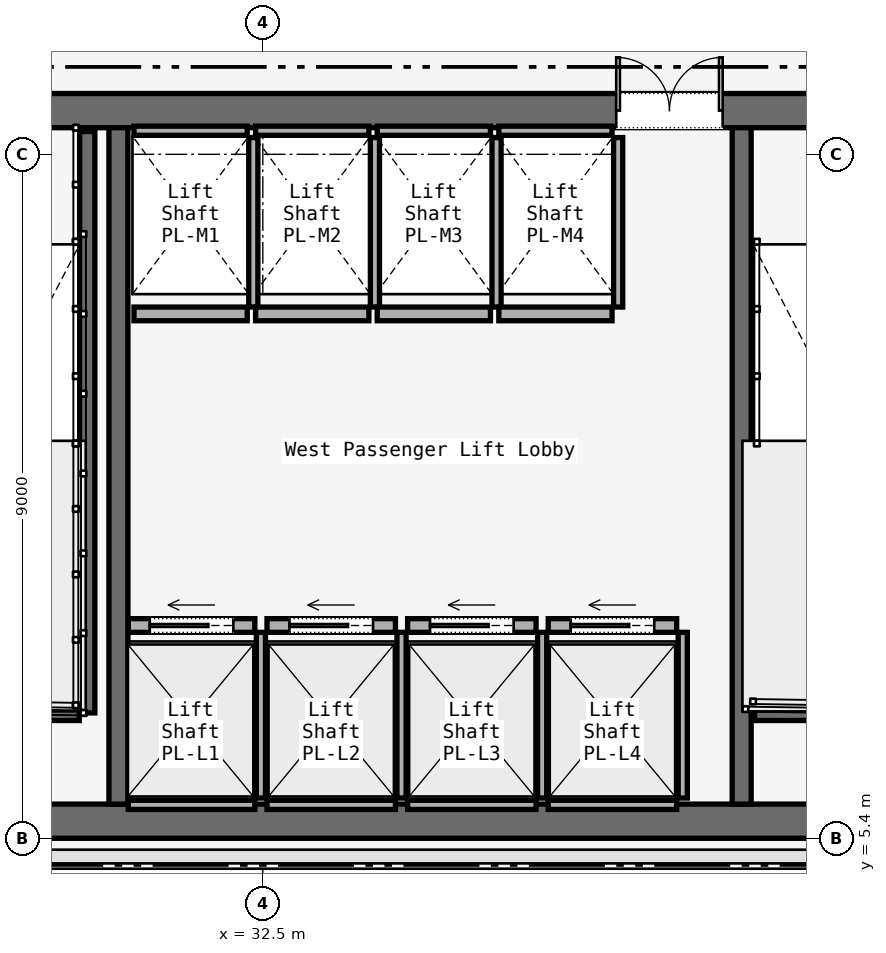
"""IFC4 building model, lengths in metres.
Left out: names, types, materials, properties, quantities, classifications, styles, units other than length and angle.
Written with IfcOpenShell. Run it as: python <this file> out.ifc"""

import sys

from ifc_helpers import new_model, si_unit, direction, frame, frame_2d, origin, place, context, subcontext, project, spatial, rectangle, extrude, element, fill, save


model = new_model("IFC4")
c1 = context("Model", 3, precision=1e-05, world=origin(), true_north=direction((0.0, 1.0)))
c2 = subcontext(c1, "Body", "Model", "MODEL_VIEW")
j1 = project(units=[si_unit("LENGTHUNIT", "METRE"), si_unit("PLANEANGLEUNIT", "RADIAN")], contexts=[c1])
p1 = place(None, origin())
s1 = spatial("IfcSite", under=j1, at=p1, CompositionType="ELEMENT")
p2 = place(p1, origin())
s2 = spatial("IfcBuilding", under=s1, at=p2, CompositionType="ELEMENT")
p3 = place(p2, frame((0.0, 0.0, 47.4)))
s3 = spatial("IfcBuildingStorey", under=s2, at=p3, CompositionType="ELEMENT", Elevation=47.4)
p4 = place(p3, frame((26.45, 14.975, 0.0), z_axis=(0.0, 0.0, 1.0), x_axis=(1.0, 0.0, 0.0)))
e1 = element("IfcWall", 1, at=p4, inside=s3, PredefinedType="SOLIDWALL", context=c2, shape_type="SweptSolid", body=[
    extrude(rectangle(XDim=31.1, YDim=0.45, at=frame_2d((15.55, 0.0))), origin(), (0.0, 0.0, 1.0), 3.58),
])
p5 = place(p4, frame((1.65, 0.0, 0.0)))
e2 = element("IfcOpeningElement", 2, at=p5, cuts=e1, PredefinedType="OPENING", context=c2, shape_type="SweptSolid", body=[
    extrude(rectangle(XDim=1.1, YDim=2.2, at=frame_2d((0.55, 1.1))), frame((0.0, 0.225, 0.0), z_axis=(0.0, -1.0, 0.0), x_axis=(1.0, 0.0, 0.0)), (0.0, 0.0, 1.0), 0.45),
])
p6 = place(p4, frame((13.65, 0.0, 0.0)))
e3 = element("IfcOpeningElement", 3, at=p6, cuts=e1, PredefinedType="OPENING", context=c2, shape_type="SweptSolid", body=[
    extrude(rectangle(XDim=1.1, YDim=2.2, at=frame_2d((0.55, 1.1))), frame((0.0, 0.225, 0.0), z_axis=(0.0, -1.0, 0.0), x_axis=(1.0, 0.0, 0.0)), (0.0, 0.0, 1.0), 0.45),
])
p7 = place(p4, frame((25.55, 0.0, 0.0)))
e4 = element("IfcOpeningElement", 4, at=p7, cuts=e1, PredefinedType="OPENING", context=c2, shape_type="SweptSolid", body=[
    extrude(rectangle(XDim=1.1, YDim=2.2, at=frame_2d((0.55, 1.1))), frame((0.0, 0.225, 0.0), z_axis=(0.0, -1.0, 0.0), x_axis=(1.0, 0.0, 0.0)), (0.0, 0.0, 1.0), 0.45),
])
p8 = place(p4, frame((10.7, 0.0, 0.0)))
e5 = element("IfcOpeningElement", 5, at=p8, cuts=e1, PredefinedType="OPENING", context=c2, shape_type="SweptSolid", body=[
    extrude(rectangle(XDim=1.4, YDim=2.2, at=frame_2d((0.7, 1.1))), frame((0.0, 0.225, 0.0), z_axis=(0.0, -1.0, 0.0), x_axis=(1.0, 0.0, 0.0)), (0.0, 0.0, 1.0), 0.45),
])
p9 = place(p4, frame((19.35, 0.0, 0.0)))
e6 = element("IfcOpeningElement", 6, at=p9, cuts=e1, PredefinedType="OPENING", context=c2, shape_type="SweptSolid", body=[
    extrude(rectangle(XDim=1.1, YDim=2.2, at=frame_2d((0.55, 1.1))), frame((0.0, 0.225, 0.0), z_axis=(0.0, -1.0, 0.0), x_axis=(1.0, 0.0, 0.0)), (0.0, 0.0, 1.0), 0.45),
])
p10 = place(p4, frame((21.4, 0.0, 0.0)))
e7 = element("IfcOpeningElement", 7, at=p10, cuts=e1, PredefinedType="OPENING", context=c2, shape_type="SweptSolid", body=[
    extrude(rectangle(XDim=0.9, YDim=2.1, at=frame_2d((0.45, 1.05))), frame((0.0, 0.225, 0.0), z_axis=(0.0, -1.0, 0.0), x_axis=(1.0, 0.0, 0.0)), (0.0, 0.0, 1.0), 0.45),
])
p11 = place(p4, frame((23.35, 0.0, 0.0)))
e8 = element("IfcOpeningElement", 8, at=p11, cuts=e1, PredefinedType="OPENING", context=c2, shape_type="SweptSolid", body=[
    extrude(rectangle(XDim=1.3, YDim=2.3, at=frame_2d((0.65, 1.15))), frame((0.0, 0.225, 0.0), z_axis=(0.0, -1.0, 0.0), x_axis=(1.0, 0.0, 0.0)), (0.0, 0.0, 1.0), 0.45),
])
p12 = place(p3, frame((26.45, 5.625, 0.0), z_axis=(0.0, 0.0, 1.0), x_axis=(1.0, 0.0, 0.0)))
e9 = element("IfcWall", 9, at=p12, inside=s3, PredefinedType="SOLIDWALL", context=c2, shape_type="SweptSolid", body=[
    extrude(rectangle(XDim=31.1, YDim=0.45, at=frame_2d((15.55, 0.0))), origin(), (0.0, 0.0, 1.0), 3.58),
])
for number, where, z_axis, x_axis in (
    (10, (30.6, 5.85, 0.0), (0.0, 0.0, 1.0), (0.0, 1.0, 0.0)),
    (11, (38.8, 5.85, 0.0), (0.0, 0.0, 1.0), (0.0, 1.0, 0.0)),
):
    element("IfcWall", number, at=place(p3, frame(where, z_axis=z_axis, x_axis=x_axis)), inside=s3, PredefinedType="SOLIDWALL", context=c2, shape_type="SweptSolid", body=[
        extrude(rectangle(XDim=8.9, YDim=0.25, at=frame_2d((4.45, 0.0))), origin(), (0.0, 0.0, 1.0), 3.58),
    ])
p13 = place(p3, frame((30.19, 14.7, 0.0), z_axis=(0.0, 0.0, 1.0), x_axis=(0.0, -1.0, 0.0)))
e12 = element("IfcWall", 12, at=p13, inside=s3, PredefinedType="SOLIDWALL", context=c2, shape_type="SweptSolid", body=[
    extrude(rectangle(XDim=7.65, YDim=0.2, at=frame_2d((3.825, 0.0))), origin(), (0.0, 0.0, 1.0), 3.8),
])
for number, where, z_axis, x_axis in (
    (13, (26.97, 7.05, 0.0), (0.0, 0.0, 1.0), (1.0, 0.0, 0.0)),
    (14, (38.97, 7.05, 0.0), (0.0, 0.0, 1.0), (1.0, 0.0, 0.0)),
):
    element("IfcWall", number, at=place(p3, frame(where, z_axis=z_axis, x_axis=x_axis)), inside=s3, PredefinedType="SOLIDWALL", context=c2, shape_type="SweptSolid", body=[
        extrude(rectangle(XDim=3.115, YDim=0.2, at=frame_2d((1.558, 0.0))), origin(), (0.0, 0.0, 1.0), 3.8),
    ])
p14 = place(p3, frame((30.73, 8.2, 0.0), z_axis=(0.0, 0.0, 1.0), x_axis=(1.0, 0.0, 0.0)))
e15 = element("IfcWall", 15, at=p14, inside=s3, PredefinedType="SOLIDWALL", context=c2, shape_type="SweptSolid", body=[
    extrude(rectangle(XDim=1.665, YDim=0.18, at=frame_2d((0.833, 0.0))), origin(), (0.0, 0.0, 1.0), 2.933),
])
p15 = place(p14, frame((0.282, 0.0, 0.0)))
e16 = element("IfcOpeningElement", 16, at=p15, cuts=e15, PredefinedType="OPENING", context=c2, shape_type="SweptSolid", body=[
    extrude(rectangle(XDim=1.1, YDim=2.2, at=frame_2d((0.55, 1.1))), frame((0.0, 0.09, 0.0), z_axis=(0.0, -1.0, 0.0), x_axis=(1.0, 0.0, 0.0)), (0.0, 0.0, 1.0), 0.18),
])
p16 = place(p3, frame((30.73, 5.84, 0.0), z_axis=(0.0, 0.0, 1.0), x_axis=(1.0, 0.0, 0.0)))
e17 = element("IfcWall", 17, at=p16, inside=s3, PredefinedType="SOLIDWALL", context=c2, shape_type="SweptSolid", body=[
    extrude(rectangle(XDim=1.665, YDim=0.12, at=frame_2d((0.833, 0.0))), origin(), (0.0, 0.0, 1.0), 2.933),
])
p17 = place(p3, frame((32.475, 5.93, 0.0), z_axis=(0.0, 0.0, 1.0), x_axis=(0.0, 1.0, 0.0)))
e18 = element("IfcWall", 18, at=p17, inside=s3, PredefinedType="SOLIDWALL", context=c2, shape_type="SweptSolid", body=[
    extrude(rectangle(XDim=2.18, YDim=0.12, at=frame_2d((1.09, 0.0))), origin(), (0.0, 0.0, 1.0), 2.933),
])
p18 = place(p3, frame((32.555, 8.2, 0.0), z_axis=(0.0, 0.0, 1.0), x_axis=(1.0, 0.0, 0.0)))
e19 = element("IfcWall", 19, at=p18, inside=s3, PredefinedType="SOLIDWALL", context=c2, shape_type="SweptSolid", body=[
    extrude(rectangle(XDim=1.69, YDim=0.18, at=frame_2d((0.845, 0.0))), origin(), (0.0, 0.0, 1.0), 2.933),
])
p19 = place(p18, frame((0.295, 0.0, 0.0)))
e20 = element("IfcOpeningElement", 20, at=p19, cuts=e19, PredefinedType="OPENING", context=c2, shape_type="SweptSolid", body=[
    extrude(rectangle(XDim=1.1, YDim=2.2, at=frame_2d((0.55, 1.1))), frame((0.0, 0.09, 0.0), z_axis=(0.0, -1.0, 0.0), x_axis=(1.0, 0.0, 0.0)), (0.0, 0.0, 1.0), 0.18),
])
p20 = place(p3, frame((32.555, 5.84, 0.0), z_axis=(0.0, 0.0, 1.0), x_axis=(1.0, 0.0, 0.0)))
e21 = element("IfcWall", 21, at=p20, inside=s3, PredefinedType="SOLIDWALL", context=c2, shape_type="SweptSolid", body=[
    extrude(rectangle(XDim=1.69, YDim=0.12, at=frame_2d((0.845, 0.0))), origin(), (0.0, 0.0, 1.0), 2.933),
])
p21 = place(p3, frame((34.325, 5.93, 0.0), z_axis=(0.0, 0.0, 1.0), x_axis=(0.0, 1.0, 0.0)))
e22 = element("IfcWall", 22, at=p21, inside=s3, PredefinedType="SOLIDWALL", context=c2, shape_type="SweptSolid", body=[
    extrude(rectangle(XDim=2.18, YDim=0.12, at=frame_2d((1.09, 0.0))), origin(), (0.0, 0.0, 1.0), 2.933),
])
p22 = place(p3, frame((34.405, 8.2, 0.0), z_axis=(0.0, 0.0, 1.0), x_axis=(1.0, 0.0, 0.0)))
e23 = element("IfcWall", 23, at=p22, inside=s3, PredefinedType="SOLIDWALL", context=c2, shape_type="SweptSolid", body=[
    extrude(rectangle(XDim=1.69, YDim=0.18, at=frame_2d((0.845, 0.0))), origin(), (0.0, 0.0, 1.0), 2.933),
])
p23 = place(p22, frame((0.295, 0.0, 0.0)))
e24 = element("IfcOpeningElement", 24, at=p23, cuts=e23, PredefinedType="OPENING", context=c2, shape_type="SweptSolid", body=[
    extrude(rectangle(XDim=1.1, YDim=2.2, at=frame_2d((0.55, 1.1))), frame((0.0, 0.09, 0.0), z_axis=(0.0, -1.0, 0.0), x_axis=(1.0, 0.0, 0.0)), (0.0, 0.0, 1.0), 0.18),
])
p24 = place(p3, frame((34.405, 5.84, 0.0), z_axis=(0.0, 0.0, 1.0), x_axis=(1.0, 0.0, 0.0)))
e25 = element("IfcWall", 25, at=p24, inside=s3, PredefinedType="SOLIDWALL", context=c2, shape_type="SweptSolid", body=[
    extrude(rectangle(XDim=1.69, YDim=0.12, at=frame_2d((0.845, 0.0))), origin(), (0.0, 0.0, 1.0), 2.933),
])
p25 = place(p3, frame((36.175, 5.93, 0.0), z_axis=(0.0, 0.0, 1.0), x_axis=(0.0, 1.0, 0.0)))
e26 = element("IfcWall", 26, at=p25, inside=s3, PredefinedType="SOLIDWALL", context=c2, shape_type="SweptSolid", body=[
    extrude(rectangle(XDim=2.18, YDim=0.12, at=frame_2d((1.09, 0.0))), origin(), (0.0, 0.0, 1.0), 2.933),
])
p26 = place(p3, frame((36.255, 8.2, 0.0), z_axis=(0.0, 0.0, 1.0), x_axis=(1.0, 0.0, 0.0)))
e27 = element("IfcWall", 27, at=p26, inside=s3, PredefinedType="SOLIDWALL", context=c2, shape_type="SweptSolid", body=[
    extrude(rectangle(XDim=1.69, YDim=0.18, at=frame_2d((0.845, 0.0))), origin(), (0.0, 0.0, 1.0), 2.933),
])
p27 = place(p26, frame((0.295, 0.0, 0.0)))
e28 = element("IfcOpeningElement", 28, at=p27, cuts=e27, PredefinedType="OPENING", context=c2, shape_type="SweptSolid", body=[
    extrude(rectangle(XDim=1.1, YDim=2.2, at=frame_2d((0.55, 1.1))), frame((0.0, 0.09, 0.0), z_axis=(0.0, -1.0, 0.0), x_axis=(1.0, 0.0, 0.0)), (0.0, 0.0, 1.0), 0.18),
])
p28 = place(p3, frame((36.255, 5.84, 0.0), z_axis=(0.0, 0.0, 1.0), x_axis=(1.0, 0.0, 0.0)))
e29 = element("IfcWall", 29, at=p28, inside=s3, PredefinedType="SOLIDWALL", context=c2, shape_type="SweptSolid", body=[
    extrude(rectangle(XDim=1.69, YDim=0.12, at=frame_2d((0.845, 0.0))), origin(), (0.0, 0.0, 1.0), 2.933),
])
p29 = place(p3, frame((38.025, 5.93, 0.0), z_axis=(0.0, 0.0, 1.0), x_axis=(0.0, 1.0, 0.0)))
e30 = element("IfcWall", 30, at=p29, inside=s3, PredefinedType="SOLIDWALL", context=c2, shape_type="SweptSolid", body=[
    extrude(rectangle(XDim=2.18, YDim=0.12, at=frame_2d((1.09, 0.0))), origin(), (0.0, 0.0, 1.0), 2.933),
])
p30 = place(p3, frame((30.805, 12.3, 0.0), z_axis=(0.0, 0.0, 1.0), x_axis=(1.0, 0.0, 0.0)))
e31 = element("IfcWall", 31, at=p30, inside=s3, PredefinedType="SOLIDWALL", context=c2, shape_type="SweptSolid", body=[
    extrude(rectangle(XDim=1.49, YDim=0.18, at=frame_2d((0.745, 0.0))), origin(), (0.0, 0.0, 1.0), 2.933),
])
p31 = place(p3, frame((30.805, 14.71, 0.0), z_axis=(0.0, 0.0, 1.0), x_axis=(1.0, 0.0, 0.0)))
e32 = element("IfcWall", 32, at=p31, inside=s3, PredefinedType="SOLIDWALL", context=c2, shape_type="SweptSolid", body=[
    extrude(rectangle(XDim=1.49, YDim=0.12, at=frame_2d((0.745, 0.0))), origin(), (0.0, 0.0, 1.0), 2.933),
])
p32 = place(p3, frame((32.375, 12.39, 0.0), z_axis=(0.0, 0.0, 1.0), x_axis=(0.0, 1.0, 0.0)))
e33 = element("IfcWall", 33, at=p32, inside=s3, PredefinedType="SOLIDWALL", context=c2, shape_type="SweptSolid", body=[
    extrude(rectangle(XDim=2.23, YDim=0.12, at=frame_2d((1.115, 0.0))), origin(), (0.0, 0.0, 1.0), 2.933),
])
p33 = place(p3, frame((32.405, 12.3, 0.0), z_axis=(0.0, 0.0, 1.0), x_axis=(1.0, 0.0, 0.0)))
e34 = element("IfcWall", 34, at=p33, inside=s3, PredefinedType="SOLIDWALL", context=c2, shape_type="SweptSolid", body=[
    extrude(rectangle(XDim=1.49, YDim=0.18, at=frame_2d((0.745, 0.0))), origin(), (0.0, 0.0, 1.0), 2.933),
])
p34 = place(p3, frame((32.405, 14.71, 0.0), z_axis=(0.0, 0.0, 1.0), x_axis=(1.0, 0.0, 0.0)))
e35 = element("IfcWall", 35, at=p34, inside=s3, PredefinedType="SOLIDWALL", context=c2, shape_type="SweptSolid", body=[
    extrude(rectangle(XDim=1.49, YDim=0.12, at=frame_2d((0.745, 0.0))), origin(), (0.0, 0.0, 1.0), 2.933),
])
p35 = place(p3, frame((33.975, 12.39, 0.0), z_axis=(0.0, 0.0, 1.0), x_axis=(0.0, 1.0, 0.0)))
e36 = element("IfcWall", 36, at=p35, inside=s3, PredefinedType="SOLIDWALL", context=c2, shape_type="SweptSolid", body=[
    extrude(rectangle(XDim=2.23, YDim=0.12, at=frame_2d((1.115, 0.0))), origin(), (0.0, 0.0, 1.0), 2.933),
])
p36 = place(p3, frame((34.005, 12.3, 0.0), z_axis=(0.0, 0.0, 1.0), x_axis=(1.0, 0.0, 0.0)))
e37 = element("IfcWall", 37, at=p36, inside=s3, PredefinedType="SOLIDWALL", context=c2, shape_type="SweptSolid", body=[
    extrude(rectangle(XDim=1.49, YDim=0.18, at=frame_2d((0.745, 0.0))), origin(), (0.0, 0.0, 1.0), 2.933),
])
p37 = place(p3, frame((34.005, 14.71, 0.0), z_axis=(0.0, 0.0, 1.0), x_axis=(1.0, 0.0, 0.0)))
e38 = element("IfcWall", 38, at=p37, inside=s3, PredefinedType="SOLIDWALL", context=c2, shape_type="SweptSolid", body=[
    extrude(rectangle(XDim=1.49, YDim=0.12, at=frame_2d((0.745, 0.0))), origin(), (0.0, 0.0, 1.0), 2.933),
])
p38 = place(p3, frame((35.575, 12.39, 0.0), z_axis=(0.0, 0.0, 1.0), x_axis=(0.0, 1.0, 0.0)))
e39 = element("IfcWall", 39, at=p38, inside=s3, PredefinedType="SOLIDWALL", context=c2, shape_type="SweptSolid", body=[
    extrude(rectangle(XDim=2.23, YDim=0.12, at=frame_2d((1.115, 0.0))), origin(), (0.0, 0.0, 1.0), 2.933),
])
p39 = place(p3, frame((35.605, 12.3, 0.0), z_axis=(0.0, 0.0, 1.0), x_axis=(1.0, 0.0, 0.0)))
e40 = element("IfcWall", 40, at=p39, inside=s3, PredefinedType="SOLIDWALL", context=c2, shape_type="SweptSolid", body=[
    extrude(rectangle(XDim=1.49, YDim=0.18, at=frame_2d((0.745, 0.0))), origin(), (0.0, 0.0, 1.0), 2.933),
])
p40 = place(p3, frame((35.605, 14.71, 0.0), z_axis=(0.0, 0.0, 1.0), x_axis=(1.0, 0.0, 0.0)))
e41 = element("IfcWall", 41, at=p40, inside=s3, PredefinedType="SOLIDWALL", context=c2, shape_type="SweptSolid", body=[
    extrude(rectangle(XDim=1.49, YDim=0.12, at=frame_2d((0.745, 0.0))), origin(), (0.0, 0.0, 1.0), 2.933),
])
p41 = place(p3, frame((37.175, 12.39, 0.0), z_axis=(0.0, 0.0, 1.0), x_axis=(0.0, 1.0, 0.0)))
e42 = element("IfcWall", 42, at=p41, inside=s3, PredefinedType="SOLIDWALL", context=c2, shape_type="SweptSolid", body=[
    extrude(rectangle(XDim=2.23, YDim=0.12, at=frame_2d((1.115, 0.0))), origin(), (0.0, 0.0, 1.0), 2.933),
])
p42 = place(p8, origin())
e43 = element("IfcDoor", 43, at=p42, inside=s3, OperationType="DOUBLE_DOOR_SINGLE_SWING", PredefinedType="DOOR", context=c2, shape_type="SweptSolid", body=[
    extrude(rectangle(XDim=1.4, YDim=2.2, at=frame_2d((0.7, 1.1))), frame((0.0, 0.025, 0.0), z_axis=(0.0, -1.0, 0.0), x_axis=(1.0, 0.0, 0.0)), (0.0, 0.0, 1.0), 0.05),
])
fill(e5, e43)
p43 = place(p15, origin())
e44 = element("IfcDoor", 44, at=p43, inside=s3, OperationType="SLIDING_TO_LEFT", PredefinedType="DOOR", context=c2, shape_type="SweptSolid", body=[
    extrude(rectangle(XDim=1.1, YDim=2.2, at=frame_2d((0.55, 1.1))), frame((0.0, 0.025, 0.0), z_axis=(0.0, -1.0, 0.0), x_axis=(1.0, 0.0, 0.0)), (0.0, 0.0, 1.0), 0.05),
])
fill(e16, e44)
p44 = place(p19, origin())
e45 = element("IfcDoor", 45, at=p44, inside=s3, OperationType="SLIDING_TO_LEFT", PredefinedType="DOOR", context=c2, shape_type="SweptSolid", body=[
    extrude(rectangle(XDim=1.1, YDim=2.2, at=frame_2d((0.55, 1.1))), frame((0.0, 0.025, 0.0), z_axis=(0.0, -1.0, 0.0), x_axis=(1.0, 0.0, 0.0)), (0.0, 0.0, 1.0), 0.05),
])
fill(e20, e45)
p45 = place(p23, origin())
e46 = element("IfcDoor", 46, at=p45, inside=s3, OperationType="SLIDING_TO_LEFT", PredefinedType="DOOR", context=c2, shape_type="SweptSolid", body=[
    extrude(rectangle(XDim=1.1, YDim=2.2, at=frame_2d((0.55, 1.1))), frame((0.0, 0.025, 0.0), z_axis=(0.0, -1.0, 0.0), x_axis=(1.0, 0.0, 0.0)), (0.0, 0.0, 1.0), 0.05),
])
fill(e24, e46)
p46 = place(p27, origin())
e47 = element("IfcDoor", 47, at=p46, inside=s3, OperationType="SLIDING_TO_LEFT", PredefinedType="DOOR", context=c2, shape_type="SweptSolid", body=[
    extrude(rectangle(XDim=1.1, YDim=2.2, at=frame_2d((0.55, 1.1))), frame((0.0, 0.025, 0.0), z_axis=(0.0, -1.0, 0.0), x_axis=(1.0, 0.0, 0.0)), (0.0, 0.0, 1.0), 0.05),
])
fill(e28, e47)
save(model, sys.argv[1])
